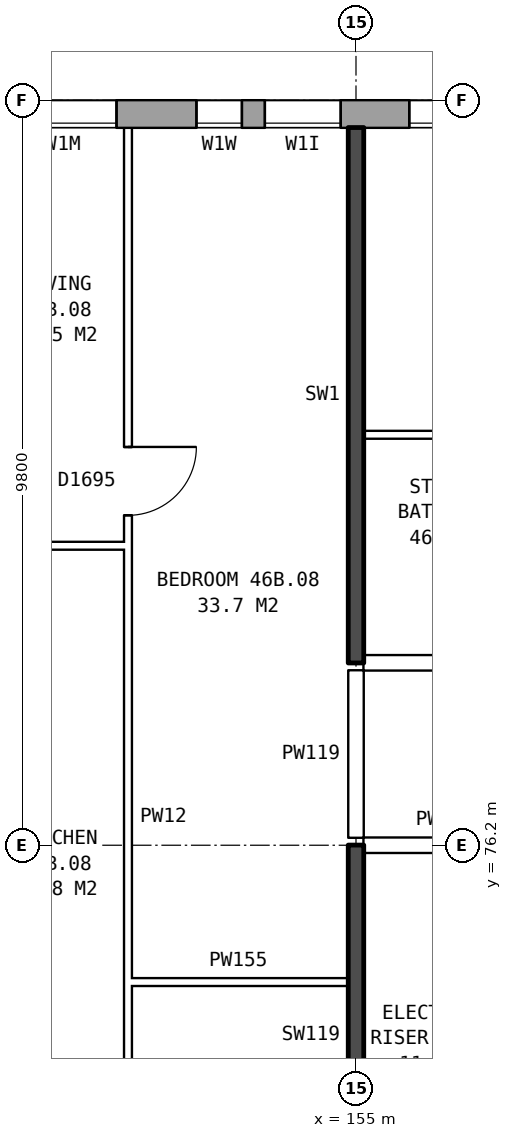
"""IFC4 building model, lengths in metres.
Left out: names, types, materials, properties, quantities, classifications, styles, units other than length and angle.
Written with IfcOpenShell. Run it as: python <this file> out.ifc"""

import sys

from ifc_helpers import new_model, si_unit, direction, frame, frame_2d, origin, place, context, subcontext, project, spatial, rectangle, extrude, element, fill, save


model = new_model("IFC4")
c1 = context("Model", 3, precision=1e-05, world=origin(), true_north=direction((0.0, 1.0)))
c2 = subcontext(c1, "Body", "Model", "MODEL_VIEW")
j1 = project(units=[si_unit("LENGTHUNIT", "METRE"), si_unit("PLANEANGLEUNIT", "RADIAN")], contexts=[c1])
p1 = place(None, origin())
s1 = spatial("IfcSite", under=j1, at=p1, CompositionType="ELEMENT")
p2 = place(p1, origin())
s2 = spatial("IfcBuilding", under=s1, at=p2, CompositionType="ELEMENT")
p3 = place(p2, frame((0.0, 0.0, 164.0)))
s3 = spatial("IfcBuildingStorey", under=s2, at=p3, CompositionType="ELEMENT", Elevation=164.0)
p4 = place(p3, frame((168.425, 85.82, 0.0), z_axis=(0.0, 0.0, 1.0), x_axis=(-1.0, 0.0, 0.0)))
e1 = element("IfcWall", 1, at=p4, inside=s3, PredefinedType="STANDARD", context=c2, shape_type="SweptSolid", body=[
    extrude(rectangle(XDim=34.351, YDim=0.36, at=frame_2d((17.175, 0.0))), origin(), (0.0, 0.0, 1.0), 2.85),
])
p5 = place(p4, frame((2.125, 0.0, 0.8)))
e2 = element("IfcOpeningElement", 2, at=p5, cuts=e1, PredefinedType="OPENING", context=c2, shape_type="SweptSolid", body=[
    extrude(rectangle(XDim=1.6, YDim=1.8, at=frame_2d((0.8, 0.9))), frame((0.0, 0.19, 0.0), z_axis=(0.0, -1.0, 0.0), x_axis=(1.0, 0.0, 0.0)), (0.0, 0.0, 1.0), 0.38),
])
p6 = place(p4, frame((5.125, 0.0, 0.8)))
e3 = element("IfcOpeningElement", 3, at=p6, cuts=e1, PredefinedType="OPENING", context=c2, shape_type="SweptSolid", body=[
    extrude(rectangle(XDim=1.6, YDim=1.8, at=frame_2d((0.8, 0.9))), frame((0.0, 0.19, 0.0), z_axis=(0.0, -1.0, 0.0), x_axis=(1.0, 0.0, 0.0)), (0.0, 0.0, 1.0), 0.38),
])
p7 = place(p4, frame((8.125, 0.0, 0.8)))
e4 = element("IfcOpeningElement", 4, at=p7, cuts=e1, PredefinedType="OPENING", context=c2, shape_type="SweptSolid", body=[
    extrude(rectangle(XDim=1.6, YDim=1.8, at=frame_2d((0.8, 0.9))), frame((0.0, 0.19, 0.0), z_axis=(0.0, -1.0, 0.0), x_axis=(1.0, 0.0, 0.0)), (0.0, 0.0, 1.0), 0.38),
])
p8 = place(p4, frame((11.125, 0.0, 0.8)))
e5 = element("IfcOpeningElement", 5, at=p8, cuts=e1, PredefinedType="OPENING", context=c2, shape_type="SweptSolid", body=[
    extrude(rectangle(XDim=1.6, YDim=1.8, at=frame_2d((0.8, 0.9))), frame((0.0, 0.19, 0.0), z_axis=(0.0, -1.0, 0.0), x_axis=(1.0, 0.0, 0.0)), (0.0, 0.0, 1.0), 0.38),
])
p9 = place(p4, frame((13.625, 0.0, 0.9)))
e6 = element("IfcOpeningElement", 6, at=p9, cuts=e1, PredefinedType="OPENING", context=c2, shape_type="SweptSolid", body=[
    extrude(rectangle(XDim=1.0, YDim=1.5, at=frame_2d((0.5, 0.75))), frame((0.0, 0.19, 0.0), z_axis=(0.0, -1.0, 0.0), x_axis=(1.0, 0.0, 0.0)), (0.0, 0.0, 1.0), 0.38),
])
p10 = place(p4, frame((16.575, 0.0, 0.25)))
e7 = element("IfcOpeningElement", 7, at=p10, cuts=e1, PredefinedType="OPENING", context=c2, shape_type="SweptSolid", body=[
    extrude(rectangle(XDim=1.4, YDim=1.2, at=frame_2d((0.7, 0.6))), frame((0.0, 0.19, 0.0), z_axis=(0.0, -1.0, 0.0), x_axis=(1.0, 0.0, 0.0)), (0.0, 0.0, 1.0), 0.38),
])
p11 = place(p4, frame((20.125, 0.0, 0.8)))
e8 = element("IfcOpeningElement", 8, at=p11, cuts=e1, PredefinedType="OPENING", context=c2, shape_type="SweptSolid", body=[
    extrude(rectangle(XDim=1.6, YDim=1.8, at=frame_2d((0.8, 0.9))), frame((0.0, 0.19, 0.0), z_axis=(0.0, -1.0, 0.0), x_axis=(1.0, 0.0, 0.0)), (0.0, 0.0, 1.0), 0.38),
])
p12 = place(p4, frame((23.125, 0.0, 0.8)))
e9 = element("IfcOpeningElement", 9, at=p12, cuts=e1, PredefinedType="OPENING", context=c2, shape_type="SweptSolid", body=[
    extrude(rectangle(XDim=1.6, YDim=1.8, at=frame_2d((0.8, 0.9))), frame((0.0, 0.19, 0.0), z_axis=(0.0, -1.0, 0.0), x_axis=(1.0, 0.0, 0.0)), (0.0, 0.0, 1.0), 0.38),
])
p13 = place(p4, frame((26.125, 0.0, 0.8)))
e10 = element("IfcOpeningElement", 10, at=p13, cuts=e1, PredefinedType="OPENING", context=c2, shape_type="SweptSolid", body=[
    extrude(rectangle(XDim=1.6, YDim=1.8, at=frame_2d((0.8, 0.9))), frame((0.0, 0.19, 0.0), z_axis=(0.0, -1.0, 0.0), x_axis=(1.0, 0.0, 0.0)), (0.0, 0.0, 1.0), 0.38),
])
p14 = place(p4, frame((29.125, 0.0, 0.8)))
e11 = element("IfcOpeningElement", 11, at=p14, cuts=e1, PredefinedType="OPENING", context=c2, shape_type="SweptSolid", body=[
    extrude(rectangle(XDim=1.6, YDim=1.8, at=frame_2d((0.8, 0.9))), frame((0.0, 0.19, 0.0), z_axis=(0.0, -1.0, 0.0), x_axis=(1.0, 0.0, 0.0)), (0.0, 0.0, 1.0), 0.38),
])
p15 = place(p4, frame((32.125, 0.0, 0.8)))
e12 = element("IfcOpeningElement", 12, at=p15, cuts=e1, PredefinedType="OPENING", context=c2, shape_type="SweptSolid", body=[
    extrude(rectangle(XDim=1.6, YDim=1.8, at=frame_2d((0.8, 0.9))), frame((0.0, 0.19, 0.0), z_axis=(0.0, -1.0, 0.0), x_axis=(1.0, 0.0, 0.0)), (0.0, 0.0, 1.0), 0.38),
])
p16 = place(p4, frame((14.925, 0.0, 1.7)))
e13 = element("IfcOpeningElement", 13, at=p16, cuts=e1, PredefinedType="OPENING", context=c2, shape_type="SweptSolid", body=[
    extrude(rectangle(XDim=0.6, YDim=0.9, at=frame_2d((0.3, 0.45))), frame((0.0, 0.19, 0.0), z_axis=(0.0, -1.0, 0.0), x_axis=(1.0, 0.0, 0.0)), (0.0, 0.0, 1.0), 0.38),
])
p17 = place(p3, frame((152.0, 74.4, 0.0), z_axis=(0.0, 0.0, 1.0), x_axis=(1.0, 0.0, 0.0)))
e14 = element("IfcWall", 14, at=p17, inside=s3, PredefinedType="PARTITIONING", context=c2, shape_type="SweptSolid", body=[
    extrude(rectangle(XDim=2.9, YDim=0.1, at=frame_2d((1.45, 0.0))), origin(), (0.0, 0.0, 1.0), 2.85),
])
p18 = place(p3, frame((155.1, 76.2, 0.0), z_axis=(0.0, 0.0, 1.0), x_axis=(1.0, 0.0, 0.0)))
e15 = element("IfcWall", 15, at=p18, inside=s3, PredefinedType="PARTITIONING", context=c2, shape_type="SweptSolid", body=[
    extrude(rectangle(XDim=2.14, YDim=0.2, at=frame_2d((1.07, 0.0))), origin(), (0.0, 0.0, 1.0), 2.85),
])
p19 = place(p3, frame((155.1, 78.6, 0.0), z_axis=(0.0, 0.0, 1.0), x_axis=(1.0, 0.0, 0.0)))
e16 = element("IfcWall", 16, at=p19, inside=s3, PredefinedType="PARTITIONING", context=c2, shape_type="SweptSolid", body=[
    extrude(rectangle(XDim=16.04, YDim=0.2, at=frame_2d((8.02, 0.0))), origin(), (0.0, 0.0, 1.0), 2.85),
])
p20 = place(p19, frame((3.6, 0.0, 0.0)))
e17 = element("IfcOpeningElement", 17, at=p20, cuts=e16, PredefinedType="OPENING", context=c2, shape_type="SweptSolid", body=[
    extrude(rectangle(XDim=1.0, YDim=2.1, at=frame_2d((0.5, 1.05))), frame((0.0, 0.11, 0.0), z_axis=(0.0, -1.0, 0.0), x_axis=(1.0, 0.0, 0.0)), (0.0, 0.0, 1.0), 0.22),
])
p21 = place(p19, frame((8.4, 0.0, 0.0)))
e18 = element("IfcOpeningElement", 18, at=p21, cuts=e16, PredefinedType="OPENING", context=c2, shape_type="SweptSolid", body=[
    extrude(rectangle(XDim=1.0, YDim=2.1, at=frame_2d((0.5, 1.05))), frame((0.0, 0.11, 0.0), z_axis=(0.0, -1.0, 0.0), x_axis=(1.0, 0.0, 0.0)), (0.0, 0.0, 1.0), 0.22),
])
p22 = place(p3, frame((146.0, 80.14, 0.0), z_axis=(0.0, 0.0, 1.0), x_axis=(1.0, 0.0, 0.0)))
e19 = element("IfcWall", 19, at=p22, inside=s3, PredefinedType="PARTITIONING", context=c2, shape_type="SweptSolid", body=[
    extrude(rectangle(XDim=6.0, YDim=0.1, at=frame_2d((3.0, 0.0))), origin(), (0.0, 0.0, 1.0), 2.85),
])
p23 = place(p22, frame((1.05, 0.0, 0.0)))
e20 = element("IfcOpeningElement", 20, at=p23, cuts=e19, PredefinedType="OPENING", context=c2, shape_type="SweptSolid", body=[
    extrude(rectangle(XDim=0.9, YDim=2.1, at=frame_2d((0.45, 1.05))), frame((0.0, 0.06, 0.0), z_axis=(0.0, -1.0, 0.0), x_axis=(1.0, 0.0, 0.0)), (0.0, 0.0, 1.0), 0.12),
])
p24 = place(p22, frame((4.05, 0.0, 0.0)))
e21 = element("IfcOpeningElement", 21, at=p24, cuts=e19, PredefinedType="OPENING", context=c2, shape_type="SweptSolid", body=[
    extrude(rectangle(XDim=0.9, YDim=2.1, at=frame_2d((0.45, 1.05))), frame((0.0, 0.06, 0.0), z_axis=(0.0, -1.0, 0.0), x_axis=(1.0, 0.0, 0.0)), (0.0, 0.0, 1.0), 0.12),
])
p25 = place(p3, frame((155.1, 81.6, 0.0), z_axis=(0.0, 0.0, 1.0), x_axis=(1.0, 0.0, 0.0)))
e22 = element("IfcWall", 22, at=p25, inside=s3, PredefinedType="PARTITIONING", context=c2, shape_type="SweptSolid", body=[
    extrude(rectangle(XDim=2.3, YDim=0.1, at=frame_2d((1.15, 0.0))), origin(), (0.0, 0.0, 1.0), 2.85),
])
p26 = place(p3, frame((152.0, 71.3, 0.0), z_axis=(0.0, 0.0, 1.0), x_axis=(0.0, 1.0, 0.0)))
e23 = element("IfcWall", 23, at=p26, inside=s3, PredefinedType="PARTITIONING", context=c2, shape_type="SweptSolid", body=[
    extrude(rectangle(XDim=14.34, YDim=0.1, at=frame_2d((7.17, 0.0))), origin(), (0.0, 0.0, 1.0), 2.85),
])
p27 = place(p26, frame((9.24, 0.0, 0.0)))
e24 = element("IfcOpeningElement", 24, at=p27, cuts=e23, PredefinedType="OPENING", context=c2, shape_type="SweptSolid", body=[
    extrude(rectangle(XDim=0.9, YDim=2.1, at=frame_2d((0.45, 1.05))), frame((0.0, 0.06, 0.0), z_axis=(0.0, -1.0, 0.0), x_axis=(1.0, 0.0, 0.0)), (0.0, 0.0, 1.0), 0.12),
])
p28 = place(p26, frame((0.4, 0.0, 0.0)))
e25 = element("IfcOpeningElement", 25, at=p28, cuts=e23, PredefinedType="OPENING", context=c2, shape_type="SweptSolid", body=[
    extrude(rectangle(XDim=0.9, YDim=2.1, at=frame_2d((0.45, 1.05))), frame((0.0, 0.06, 0.0), z_axis=(0.0, -1.0, 0.0), x_axis=(1.0, 0.0, 0.0)), (0.0, 0.0, 1.0), 0.12),
])
p29 = place(p3, frame((155.0, 71.2, 0.0), z_axis=(0.0, 0.0, 1.0), x_axis=(0.0, 1.0, 0.0)))
e26 = element("IfcWall", 26, at=p29, inside=s3, PredefinedType="SOLIDWALL", context=c2, shape_type="SweptSolid", body=[
    extrude(rectangle(XDim=5.0, YDim=0.2, at=frame_2d((2.5, 0.0))), origin(), (0.0, 0.0, 1.0), 2.85),
])
p30 = place(p3, frame((155.0, 76.3, 0.0), z_axis=(0.0, 0.0, 1.0), x_axis=(0.0, 1.0, 0.0)))
e27 = element("IfcWall", 27, at=p30, inside=s3, PredefinedType="PARTITIONING", context=c2, shape_type="SweptSolid", body=[
    extrude(rectangle(XDim=2.2, YDim=0.2, at=frame_2d((1.1, 0.0))), origin(), (0.0, 0.0, 1.0), 2.85),
])
p31 = place(p3, frame((155.0, 78.6, 0.0), z_axis=(0.0, 0.0, 1.0), x_axis=(0.0, 1.0, 0.0)))
e28 = element("IfcWall", 28, at=p31, inside=s3, PredefinedType="SOLIDWALL", context=c2, shape_type="SweptSolid", body=[
    extrude(rectangle(XDim=7.04, YDim=0.2, at=frame_2d((3.52, 0.0))), origin(), (0.0, 0.0, 1.0), 2.85),
])
p32 = place(p8, origin())
e29 = element("IfcWindow", 29, at=p32, inside=s3, PartitioningType="SINGLE_PANEL", PredefinedType="WINDOW", context=c2, shape_type="SweptSolid", body=[
    extrude(rectangle(XDim=1.6, YDim=1.8, at=frame_2d((0.8, 0.9))), frame((0.0, 0.15, 0.0), z_axis=(0.0, -1.0, 0.0), x_axis=(1.0, 0.0, 0.0)), (0.0, 0.0, 1.0), 0.06),
])
fill(e5, e29)
p33 = place(p9, origin())
e30 = element("IfcWindow", 30, at=p33, inside=s3, PartitioningType="SINGLE_PANEL", PredefinedType="WINDOW", context=c2, shape_type="SweptSolid", body=[
    extrude(rectangle(XDim=1.0, YDim=1.5, at=frame_2d((0.5, 0.75))), frame((0.0, 0.15, 0.0), z_axis=(0.0, -1.0, 0.0), x_axis=(1.0, 0.0, 0.0)), (0.0, 0.0, 1.0), 0.06),
])
fill(e6, e30)
p34 = place(p10, origin())
e31 = element("IfcWindow", 31, at=p34, inside=s3, PartitioningType="SINGLE_PANEL", PredefinedType="WINDOW", context=c2, shape_type="SweptSolid", body=[
    extrude(rectangle(XDim=1.4, YDim=1.2, at=frame_2d((0.7, 0.6))), frame((0.0, 0.15, 0.0), z_axis=(0.0, -1.0, 0.0), x_axis=(1.0, 0.0, 0.0)), (0.0, 0.0, 1.0), 0.06),
])
fill(e7, e31)
p35 = place(p27, frame((0.9, 0.0, 0.0), z_axis=(0.0, 0.0, 1.0), x_axis=(-1.0, 0.0, 0.0)))
e32 = element("IfcDoor", 32, at=p35, inside=s3, OperationType="SINGLE_SWING_LEFT", PredefinedType="DOOR", context=c2, shape_type="SweptSolid", body=[
    extrude(rectangle(XDim=0.9, YDim=2.1, at=frame_2d((0.45, 1.05))), frame((0.0, 0.025, 0.0), z_axis=(0.0, -1.0, 0.0), x_axis=(1.0, 0.0, 0.0)), (0.0, 0.0, 1.0), 0.05),
])
fill(e24, e32)
p36 = place(p16, origin())
e33 = element("IfcWindow", 33, at=p36, inside=s3, PartitioningType="SINGLE_PANEL", PredefinedType="WINDOW", context=c2, shape_type="SweptSolid", body=[
    extrude(rectangle(XDim=0.6, YDim=0.9, at=frame_2d((0.3, 0.45))), frame((0.0, 0.15, 0.0), z_axis=(0.0, -1.0, 0.0), x_axis=(1.0, 0.0, 0.0)), (0.0, 0.0, 1.0), 0.06),
])
fill(e13, e33)
save(model, sys.argv[1])
